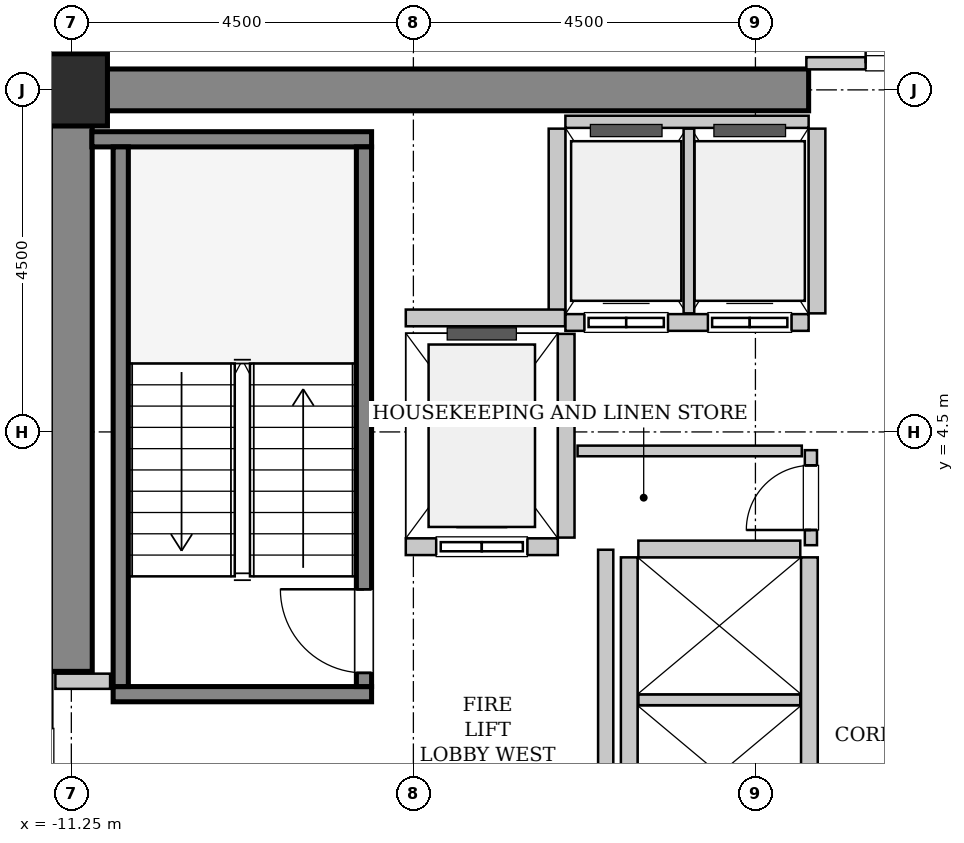
"""IFC4 building model, lengths in metres.
Left out: names, types, materials, properties, quantities, classifications, styles, units other than length and angle.
Written with IfcOpenShell. Run it as: python <this file> out.ifc"""

import sys

from ifc_helpers import new_model, si_unit, direction, frame, frame_2d, origin, origin_2d, place, context, subcontext, project, spatial, rectangle, hollow_rectangle, extrude, source, transform, mapped, element, fill, save


model = new_model("IFC4")
c1 = context("Model", 3, precision=1e-05, world=origin(), true_north=direction((0.0, 1.0)))
c2 = subcontext(c1, "Body", "Model", "MODEL_VIEW")
j1 = project(units=[si_unit("LENGTHUNIT", "METRE"), si_unit("PLANEANGLEUNIT", "RADIAN")], contexts=[c1])
p1 = place(None, origin())
s1 = spatial("IfcSite", under=j1, at=p1, CompositionType="ELEMENT")
p2 = place(p1, origin())
s2 = spatial("IfcBuilding", under=s1, at=p2, CompositionType="ELEMENT")
p3 = place(p2, frame((0.0, 0.0, 132.6)))
s3 = spatial("IfcBuildingStorey", under=s2, at=p3, CompositionType="ELEMENT", Elevation=132.6)
m1 = source(origin(), c2, "Body", "SweptSolid", [
    extrude(rectangle(XDim=9.975, YDim=0.55, at=frame_2d((4.987, 0.0))), origin(), (0.0, 0.0, 1.0), 3.8),
])
p4 = place(p3, frame((-11.525, 9.0, 0.0), z_axis=(0.0, 0.0, 1.0), x_axis=(1.0, 0.0, 0.0)))
e1 = element("IfcWall", 1, at=p4, inside=s3, PredefinedType="SHEAR", context=c2, shape_type="MappedRepresentation", body=[
    mapped(m1, transform((0.0, 0.0, 0.0), x_axis=(1.0, 0.0, 0.0), y_axis=(0.0, 1.0, 0.0), z_axis=(0.0, 0.0, 1.0), scale=1.0)),
])
m2 = source(origin(), c2, "Body", "SweptSolid", [
    extrude(rectangle(XDim=7.375, YDim=0.55, at=frame_2d((3.688, 0.0))), origin(), (0.0, 0.0, 1.0), 3.8),
])
p5 = place(p3, frame((-11.25, 1.35, 0.0), z_axis=(0.0, 0.0, 1.0), x_axis=(0.0, 1.0, 0.0)))
e2 = element("IfcWall", 2, at=p5, inside=s3, PredefinedType="SHEAR", context=c2, shape_type="MappedRepresentation", body=[
    mapped(m2, transform((0.0, 0.0, 0.0), x_axis=(1.0, 0.0, 0.0), y_axis=(0.0, 1.0, 0.0), z_axis=(0.0, 0.0, 1.0), scale=1.0)),
])
m3 = source(origin(), c2, "Body", "SweptSolid", [
    extrude(hollow_rectangle(XDim=0.95, YDim=0.95, WallThickness=0.045, InnerFilletRadius=0.045, OuterFilletRadius=0.09, at=origin_2d()), origin(), (0.0, 0.0, 1.0), 3.8),
])
p6 = place(p3, frame((-11.25, 9.0, 0.0), z_axis=(0.0, 0.0, 1.0), x_axis=(1.0, 0.0, 0.0)))
e3 = element("IfcColumn", 3, at=p6, inside=s3, PredefinedType="COLUMN", context=c2, shape_type="MappedRepresentation", body=[
    mapped(m3, transform((0.0, 0.0, 0.0), x_axis=(1.0, 0.0, 0.0), y_axis=(0.0, 1.0, 0.0), z_axis=(0.0, 0.0, 1.0), scale=1.0)),
])
m4 = source(origin(), c2, "Body", "SweptSolid", [
    extrude(rectangle(XDim=3.4, YDim=0.2, at=frame_2d((1.7, 0.0))), origin(), (0.0, 0.0, 1.0), 3.8),
])
p7 = place(p3, frame((-7.3, 1.05, 0.0), z_axis=(0.0, 0.0, 1.0), x_axis=(-1.0, 0.0, 0.0)))
e4 = element("IfcWall", 4, at=p7, inside=s3, PredefinedType="SOLIDWALL", context=c2, shape_type="MappedRepresentation", body=[
    mapped(m4, transform((0.0, 0.0, 0.0), x_axis=(1.0, 0.0, 0.0), y_axis=(0.0, 1.0, 0.0), z_axis=(0.0, 0.0, 1.0), scale=1.0)),
])
m5 = source(origin(), c2, "Body", "SweptSolid", [
    extrude(rectangle(XDim=3.68, YDim=0.2, at=frame_2d((1.84, 0.0))), origin(), (0.0, 0.0, 1.0), 3.8),
])
p8 = place(p3, frame((-7.3, 8.35, 0.0), z_axis=(0.0, 0.0, 1.0), x_axis=(-1.0, 0.0, 0.0)))
e5 = element("IfcWall", 5, at=p8, inside=s3, PredefinedType="SOLIDWALL", context=c2, shape_type="MappedRepresentation", body=[
    mapped(m5, transform((0.0, 0.0, 0.0), x_axis=(1.0, 0.0, 0.0), y_axis=(0.0, 1.0, 0.0), z_axis=(0.0, 0.0, 1.0), scale=1.0)),
])
m6 = source(origin(), c2, "Body", "SweptSolid", [
    extrude(rectangle(XDim=7.1, YDim=0.2, at=frame_2d((3.55, 0.0))), origin(), (0.0, 0.0, 1.0), 3.8),
])
p9 = place(p3, frame((-7.4, 1.15, 0.0), z_axis=(0.0, 0.0, 1.0), x_axis=(0.0, 1.0, 0.0)))
e6 = element("IfcWall", 6, at=p9, inside=s3, PredefinedType="SOLIDWALL", context=c2, shape_type="MappedRepresentation", body=[
    mapped(m6, transform((0.0, 0.0, 0.0), x_axis=(1.0, 0.0, 0.0), y_axis=(0.0, 1.0, 0.0), z_axis=(0.0, 0.0, 1.0), scale=1.0)),
])
p10 = place(p9, frame((0.18, 0.0, 0.0)))
e7 = element("IfcOpeningElement", 7, at=p10, cuts=e6, PredefinedType="OPENING", context=c2, shape_type="SweptSolid", body=[
    extrude(rectangle(XDim=1.1, YDim=2.15, at=frame_2d((0.55, 1.075))), frame((0.0, 0.11, 0.0), z_axis=(0.0, -1.0, 0.0), x_axis=(1.0, 0.0, 0.0)), (0.0, 0.0, 1.0), 0.22),
])
p11 = place(p3, frame((-10.6, 1.15, 0.0), z_axis=(0.0, 0.0, 1.0), x_axis=(0.0, 1.0, 0.0)))
e8 = element("IfcWall", 8, at=p11, inside=s3, PredefinedType="SOLIDWALL", context=c2, shape_type="MappedRepresentation", body=[
    mapped(m6, transform((0.0, 0.0, 0.0), x_axis=(1.0, 0.0, 0.0), y_axis=(0.0, 1.0, 0.0), z_axis=(0.0, 0.0, 1.0), scale=1.0)),
])
m7 = source(origin(), c2, "Body", "SweptSolid", [
    extrude(rectangle(XDim=2.0, YDim=0.22, at=frame_2d((1.0, 0.0))), origin(), (0.0, 0.0, 1.0), 3.535),
])
p12 = place(p3, frame((-6.85, 2.99, 0.0), z_axis=(0.0, 0.0, 1.0), x_axis=(1.0, 0.0, 0.0)))
e9 = element("IfcWall", 9, at=p12, inside=s3, PredefinedType="SOLIDWALL", context=c2, shape_type="MappedRepresentation", body=[
    mapped(m7, transform((0.0, 0.0, 0.0), x_axis=(1.0, 0.0, 0.0), y_axis=(0.0, 1.0, 0.0), z_axis=(0.0, 0.0, 1.0), scale=1.0)),
])
p13 = place(p12, frame((0.4, 0.0, 0.0)))
e10 = element("IfcOpeningElement", 10, at=p13, cuts=e9, PredefinedType="OPENING", context=c2, shape_type="SweptSolid", body=[
    extrude(rectangle(XDim=1.2, YDim=2.2, at=frame_2d((0.6, 1.1))), frame((0.0, 0.12, 0.0), z_axis=(0.0, -1.0, 0.0), x_axis=(1.0, 0.0, 0.0)), (0.0, 0.0, 1.0), 0.24),
])
m8 = source(origin(), c2, "Body", "SweptSolid", [
    extrude(rectangle(XDim=2.68, YDim=0.22, at=frame_2d((1.34, 0.0))), origin(), (0.0, 0.0, 1.0), 3.535),
])
p14 = place(p3, frame((-4.74, 3.11, 0.0), z_axis=(0.0, 0.0, 1.0), x_axis=(0.0, 1.0, 0.0)))
e11 = element("IfcWall", 11, at=p14, inside=s3, PredefinedType="SOLIDWALL", context=c2, shape_type="MappedRepresentation", body=[
    mapped(m8, transform((0.0, 0.0, 0.0), x_axis=(1.0, 0.0, 0.0), y_axis=(0.0, 1.0, 0.0), z_axis=(0.0, 0.0, 1.0), scale=1.0)),
])
m9 = source(origin(), c2, "Body", "SweptSolid", [
    extrude(rectangle(XDim=3.2, YDim=0.22, at=frame_2d((1.6, 0.0))), origin(), (0.0, 0.0, 1.0), 3.535),
])
p15 = place(p3, frame((-4.75, 5.94, 0.0), z_axis=(0.0, 0.0, 1.0), x_axis=(1.0, 0.0, 0.0)))
e12 = element("IfcWall", 12, at=p15, inside=s3, PredefinedType="SOLIDWALL", context=c2, shape_type="MappedRepresentation", body=[
    mapped(m9, transform((0.0, 0.0, 0.0), x_axis=(1.0, 0.0, 0.0), y_axis=(0.0, 1.0, 0.0), z_axis=(0.0, 0.0, 1.0), scale=1.0)),
])
p16 = place(p15, frame((0.25, 0.0, 0.0)))
e13 = element("IfcOpeningElement", 13, at=p16, cuts=e12, PredefinedType="OPENING", context=c2, shape_type="SweptSolid", body=[
    extrude(rectangle(XDim=1.1, YDim=2.2, at=frame_2d((0.55, 1.1))), frame((0.0, 0.12, 0.0), z_axis=(0.0, -1.0, 0.0), x_axis=(1.0, 0.0, 0.0)), (0.0, 0.0, 1.0), 0.24),
])
p17 = place(p15, frame((1.875, 0.0, 0.0)))
e14 = element("IfcOpeningElement", 14, at=p17, cuts=e12, PredefinedType="OPENING", context=c2, shape_type="SweptSolid", body=[
    extrude(rectangle(XDim=1.1, YDim=2.2, at=frame_2d((0.55, 1.1))), frame((0.0, 0.12, 0.0), z_axis=(0.0, -1.0, 0.0), x_axis=(1.0, 0.0, 0.0)), (0.0, 0.0, 1.0), 0.24),
])
m10 = source(origin(), c2, "Body", "SweptSolid", [
    extrude(rectangle(XDim=3.2, YDim=0.16, at=frame_2d((1.6, 0.0))), origin(), (0.0, 0.0, 1.0), 2.425),
])
p18 = place(p3, frame((-1.55, 8.58, 0.0), z_axis=(0.0, 0.0, 1.0), x_axis=(-1.0, 0.0, 0.0)))
e15 = element("IfcWall", 15, at=p18, inside=s3, PredefinedType="PARTITIONING", context=c2, shape_type="MappedRepresentation", body=[
    mapped(m10, transform((0.0, 0.0, 0.0), x_axis=(1.0, 0.0, 0.0), y_axis=(0.0, 1.0, 0.0), z_axis=(0.0, 0.0, 1.0), scale=1.0)),
])
m11 = source(origin(), c2, "Body", "SweptSolid", [
    extrude(rectangle(XDim=2.43, YDim=0.22, at=frame_2d((1.215, 0.0))), origin(), (0.0, 0.0, 1.0), 3.535),
])
p19 = place(p3, frame((-4.86, 8.49, 0.0), z_axis=(0.0, 0.0, 1.0), x_axis=(0.0, -1.0, 0.0)))
e16 = element("IfcWall", 16, at=p19, inside=s3, PredefinedType="SOLIDWALL", context=c2, shape_type="MappedRepresentation", body=[
    mapped(m11, transform((0.0, 0.0, 0.0), x_axis=(1.0, 0.0, 0.0), y_axis=(0.0, 1.0, 0.0), z_axis=(0.0, 0.0, 1.0), scale=1.0)),
])
m12 = source(origin(), c2, "Body", "SweptSolid", [
    extrude(rectangle(XDim=2.43, YDim=0.14, at=frame_2d((1.215, 0.0))), origin(), (0.0, 0.0, 1.0), 3.535),
])
p20 = place(p3, frame((-3.125, 6.06, 0.0), z_axis=(0.0, 0.0, 1.0), x_axis=(0.0, 1.0, 0.0)))
e17 = element("IfcWall", 17, at=p20, inside=s3, PredefinedType="PARTITIONING", context=c2, shape_type="MappedRepresentation", body=[
    mapped(m12, transform((0.0, 0.0, 0.0), x_axis=(1.0, 0.0, 0.0), y_axis=(0.0, 1.0, 0.0), z_axis=(0.0, 0.0, 1.0), scale=1.0)),
])
p21 = place(p3, frame((-1.44, 6.06, 0.0), z_axis=(0.0, 0.0, 1.0), x_axis=(0.0, 1.0, 0.0)))
e18 = element("IfcWall", 18, at=p21, inside=s3, PredefinedType="SOLIDWALL", context=c2, shape_type="MappedRepresentation", body=[
    mapped(m11, transform((0.0, 0.0, 0.0), x_axis=(1.0, 0.0, 0.0), y_axis=(0.0, 1.0, 0.0), z_axis=(0.0, 0.0, 1.0), scale=1.0)),
])
m13 = source(origin(), c2, "Body", "SweptSolid", [
    extrude(rectangle(XDim=5.7, YDim=0.22, at=frame_2d((2.85, 0.0))), origin(), (0.0, 0.0, 1.0), 3.535),
])
for number, where, z_axis, x_axis in (
    (19, (-1.54, -2.85, 0.0), (0.0, 0.0, 1.0), (0.0, 1.0, 0.0)),
    (20, (-3.91, 2.85, 0.0), (0.0, 0.0, 1.0), (0.0, -1.0, 0.0)),
):
    element("IfcWall", number, at=place(p3, frame(where, z_axis=z_axis, x_axis=x_axis)), inside=s3, PredefinedType="SOLIDWALL", context=c2, shape_type="MappedRepresentation", body=[
        mapped(m13, transform((0.0, 0.0, 0.0), x_axis=(1.0, 0.0, 0.0), y_axis=(0.0, 1.0, 0.0), z_axis=(0.0, 0.0, 1.0), scale=1.0)),
    ])
m14 = source(origin(), c2, "Body", "SweptSolid", [
    extrude(rectangle(XDim=2.13, YDim=0.14, at=frame_2d((1.065, 0.0))), origin(), (0.0, 0.0, 1.0), 3.535),
])
p22 = place(p3, frame((-3.79, 0.975, 0.0), z_axis=(0.0, 0.0, 1.0), x_axis=(1.0, 0.0, 0.0)))
e21 = element("IfcWall", 21, at=p22, inside=s3, PredefinedType="PARTITIONING", context=c2, shape_type="MappedRepresentation", body=[
    mapped(m14, transform((0.0, 0.0, 0.0), x_axis=(1.0, 0.0, 0.0), y_axis=(0.0, 1.0, 0.0), z_axis=(0.0, 0.0, 1.0), scale=1.0)),
])
m15 = source(origin(), c2, "Body", "SweptSolid", [
    extrude(rectangle(XDim=2.13, YDim=0.22, at=frame_2d((1.065, 0.0))), origin(), (0.0, 0.0, 1.0), 3.535),
])
p23 = place(p3, frame((-1.66, 2.96, 0.0), z_axis=(0.0, 0.0, 1.0), x_axis=(-1.0, 0.0, 0.0)))
e22 = element("IfcWall", 22, at=p23, inside=s3, PredefinedType="SOLIDWALL", context=c2, shape_type="MappedRepresentation", body=[
    mapped(m15, transform((0.0, 0.0, 0.0), x_axis=(1.0, 0.0, 0.0), y_axis=(0.0, 1.0, 0.0), z_axis=(0.0, 0.0, 1.0), scale=1.0)),
])
m16 = source(origin(), c2, "Body", "SweptSolid", [
    extrude(rectangle(XDim=2.095, YDim=0.22, at=frame_2d((1.048, 0.0))), origin(), (0.0, 0.0, 1.0), 3.535),
])
p24 = place(p3, frame((-6.85, 6.0, 0.0), z_axis=(0.0, 0.0, 1.0), x_axis=(1.0, 0.0, 0.0)))
e23 = element("IfcWall", 23, at=p24, inside=s3, PredefinedType="SOLIDWALL", context=c2, shape_type="MappedRepresentation", body=[
    mapped(m16, transform((0.0, 0.0, 0.0), x_axis=(1.0, 0.0, 0.0), y_axis=(0.0, 1.0, 0.0), z_axis=(0.0, 0.0, 1.0), scale=1.0)),
])
m17 = source(origin(), c2, "Body", "SweptSolid", [
    extrude(rectangle(XDim=5.9, YDim=0.2, at=frame_2d((2.95, 0.0))), origin(), (0.0, 0.0, 1.0), 3.535),
])
p25 = place(p3, frame((-4.22, -2.95, 0.0), z_axis=(0.0, 0.0, 1.0), x_axis=(0.0, 1.0, 0.0)))
e24 = element("IfcWall", 24, at=p25, inside=s3, PredefinedType="PARTITIONING", context=c2, shape_type="MappedRepresentation", body=[
    mapped(m17, transform((0.0, 0.0, 0.0), x_axis=(1.0, 0.0, 0.0), y_axis=(0.0, 1.0, 0.0), z_axis=(0.0, 0.0, 1.0), scale=1.0)),
])
m18 = source(origin(), c2, "Body", "SweptSolid", [
    extrude(rectangle(XDim=0.72, YDim=0.2, at=frame_2d((0.36, 0.0))), origin(), (0.0, 0.0, 1.0), 3.535),
])
p26 = place(p3, frame((-11.46, 1.22, 0.0), z_axis=(0.0, 0.0, 1.0), x_axis=(1.0, 0.0, 0.0)))
e25 = element("IfcWall", 25, at=p26, inside=s3, PredefinedType="PARTITIONING", context=c2, shape_type="MappedRepresentation", body=[
    mapped(m18, transform((0.0, 0.0, 0.0), x_axis=(1.0, 0.0, 0.0), y_axis=(0.0, 1.0, 0.0), z_axis=(0.0, 0.0, 1.0), scale=1.0)),
])
m19 = source(origin(), c2, "Body", "SweptSolid", [
    extrude(rectangle(XDim=3.16, YDim=0.16, at=frame_2d((1.58, 0.0))), origin(), (0.0, 0.0, 1.0), 2.425),
])
p27 = place(p3, frame((-1.58, 9.35, 0.0), z_axis=(0.0, 0.0, 1.0), x_axis=(1.0, 0.0, 0.0)))
e26 = element("IfcWall", 26, at=p27, inside=s3, PredefinedType="PARTITIONING", context=c2, shape_type="MappedRepresentation", body=[
    mapped(m19, transform((0.0, 0.0, 0.0), x_axis=(1.0, 0.0, 0.0), y_axis=(0.0, 1.0, 0.0), z_axis=(0.0, 0.0, 1.0), scale=1.0)),
])
p28 = place(p27, frame((0.78, 0.0, 0.0)))
e27 = element("IfcOpeningElement", 27, at=p28, cuts=e26, PredefinedType="OPENING", context=c2, shape_type="SweptSolid", body=[
    extrude(rectangle(XDim=1.6, YDim=2.3, at=frame_2d((0.8, 1.15))), frame((0.0, 0.09, 0.0), z_axis=(0.0, -1.0, 0.0), x_axis=(1.0, 0.0, 0.0)), (0.0, 0.0, 1.0), 0.18),
])
m20 = source(origin(), c2, "Body", "SweptSolid", [
    extrude(rectangle(XDim=1.25, YDim=0.16, at=frame_2d((0.625, 0.0))), origin(), (0.0, 0.0, 1.0), 3.535),
])
p29 = place(p3, frame((-1.52, 3.01, 0.0), z_axis=(0.0, 0.0, 1.0), x_axis=(0.0, 1.0, 0.0)))
e28 = element("IfcWall", 28, at=p29, inside=s3, PredefinedType="PARTITIONING", context=c2, shape_type="MappedRepresentation", body=[
    mapped(m20, transform((0.0, 0.0, 0.0), x_axis=(1.0, 0.0, 0.0), y_axis=(0.0, 1.0, 0.0), z_axis=(0.0, 0.0, 1.0), scale=1.0)),
])
p30 = place(p29, frame((0.2, 0.0, 0.0)))
e29 = element("IfcOpeningElement", 29, at=p30, cuts=e28, PredefinedType="OPENING", context=c2, shape_type="SweptSolid", body=[
    extrude(rectangle(XDim=0.85, YDim=2.1, at=frame_2d((0.425, 1.05))), frame((0.0, 0.09, 0.0), z_axis=(0.0, -1.0, 0.0), x_axis=(1.0, 0.0, 0.0)), (0.0, 0.0, 1.0), 0.18),
])
m21 = source(origin(), c2, "Body", "SweptSolid", [
    extrude(rectangle(XDim=2.95, YDim=0.14, at=frame_2d((1.475, 0.0))), origin(), (0.0, 0.0, 1.0), 3.535),
])
p31 = place(p3, frame((-4.59, 4.25, 0.0), z_axis=(0.0, 0.0, 1.0), x_axis=(1.0, 0.0, 0.0)))
e30 = element("IfcWall", 30, at=p31, inside=s3, PredefinedType="PARTITIONING", context=c2, shape_type="MappedRepresentation", body=[
    mapped(m21, transform((0.0, 0.0, 0.0), x_axis=(1.0, 0.0, 0.0), y_axis=(0.0, 1.0, 0.0), z_axis=(0.0, 0.0, 1.0), scale=1.0)),
])
m22 = source(origin(), c2, "Body", "SweptSolid", [
    extrude(rectangle(XDim=1.1, YDim=2.15, at=frame_2d((0.55, 1.075))), frame((0.0, 0.025, 0.0), z_axis=(0.0, -1.0, 0.0), x_axis=(1.0, 0.0, 0.0)), (0.0, 0.0, 1.0), 0.05),
])
p32 = place(p10, origin())
e31 = element("IfcDoor", 31, at=p32, inside=s3, OperationType="SINGLE_SWING_RIGHT", PredefinedType="DOOR", context=c2, shape_type="MappedRepresentation", body=[
    mapped(m22, transform((0.0, 0.0, 0.0), x_axis=(1.0, 0.0, 0.0), y_axis=(0.0, 1.0, 0.0), z_axis=(0.0, 0.0, 1.0), scale=1.0)),
])
fill(e7, e31)
m23 = source(origin(), c2, "Body", "SweptSolid", [
    extrude(rectangle(XDim=1.2, YDim=2.2, at=frame_2d((0.6, 1.1))), frame((0.0, 0.025, 0.0), z_axis=(0.0, -1.0, 0.0), x_axis=(1.0, 0.0, 0.0)), (0.0, 0.0, 1.0), 0.05),
])
p33 = place(p13, origin())
e32 = element("IfcDoor", 32, at=p33, inside=s3, OperationType="SLIDING_TO_LEFT", PredefinedType="DOOR", context=c2, shape_type="MappedRepresentation", body=[
    mapped(m23, transform((0.0, 0.0, 0.0), x_axis=(1.0, 0.0, 0.0), y_axis=(0.0, 1.0, 0.0), z_axis=(0.0, 0.0, 1.0), scale=1.0)),
])
fill(e10, e32)
m24 = source(origin(), c2, "Body", "SweptSolid", [
    extrude(rectangle(XDim=1.1, YDim=2.2, at=frame_2d((0.55, 1.1))), frame((0.0, 0.025, 0.0), z_axis=(0.0, -1.0, 0.0), x_axis=(1.0, 0.0, 0.0)), (0.0, 0.0, 1.0), 0.05),
])
p34 = place(p16, origin())
e33 = element("IfcDoor", 33, at=p34, inside=s3, OperationType="DOUBLE_DOOR_SLIDING", PredefinedType="DOOR", context=c2, shape_type="MappedRepresentation", body=[
    mapped(m24, transform((0.0, 0.0, 0.0), x_axis=(1.0, 0.0, 0.0), y_axis=(0.0, 1.0, 0.0), z_axis=(0.0, 0.0, 1.0), scale=1.0)),
])
fill(e13, e33)
p35 = place(p17, origin())
e34 = element("IfcDoor", 34, at=p35, inside=s3, OperationType="DOUBLE_DOOR_SLIDING", PredefinedType="DOOR", context=c2, shape_type="MappedRepresentation", body=[
    mapped(m24, transform((0.0, 0.0, 0.0), x_axis=(1.0, 0.0, 0.0), y_axis=(0.0, 1.0, 0.0), z_axis=(0.0, 0.0, 1.0), scale=1.0)),
])
fill(e14, e34)
m25 = source(origin(), c2, "Body", "SweptSolid", [
    extrude(rectangle(XDim=1.6, YDim=2.3, at=frame_2d((0.8, 1.15))), frame((0.0, 0.025, 0.0), z_axis=(0.0, -1.0, 0.0), x_axis=(1.0, 0.0, 0.0)), (0.0, 0.0, 1.0), 0.05),
])
p36 = place(p28, origin())
e35 = element("IfcDoor", 35, at=p36, inside=s3, OperationType="DOUBLE_DOOR_SINGLE_SWING", PredefinedType="DOOR", context=c2, shape_type="MappedRepresentation", body=[
    mapped(m25, transform((0.0, 0.0, 0.0), x_axis=(1.0, 0.0, 0.0), y_axis=(0.0, 1.0, 0.0), z_axis=(0.0, 0.0, 1.0), scale=1.0)),
])
fill(e27, e35)
m26 = source(origin(), c2, "Body", "SweptSolid", [
    extrude(rectangle(XDim=0.85, YDim=2.1, at=frame_2d((0.425, 1.05))), frame((0.0, 0.025, 0.0), z_axis=(0.0, -1.0, 0.0), x_axis=(1.0, 0.0, 0.0)), (0.0, 0.0, 1.0), 0.05),
])
p37 = place(p30, origin())
e36 = element("IfcDoor", 36, at=p37, inside=s3, OperationType="SINGLE_SWING_LEFT", PredefinedType="DOOR", context=c2, shape_type="MappedRepresentation", body=[
    mapped(m26, transform((0.0, 0.0, 0.0), x_axis=(1.0, 0.0, 0.0), y_axis=(0.0, 1.0, 0.0), z_axis=(0.0, 0.0, 1.0), scale=1.0)),
])
fill(e29, e36)
save(model, sys.argv[1])
